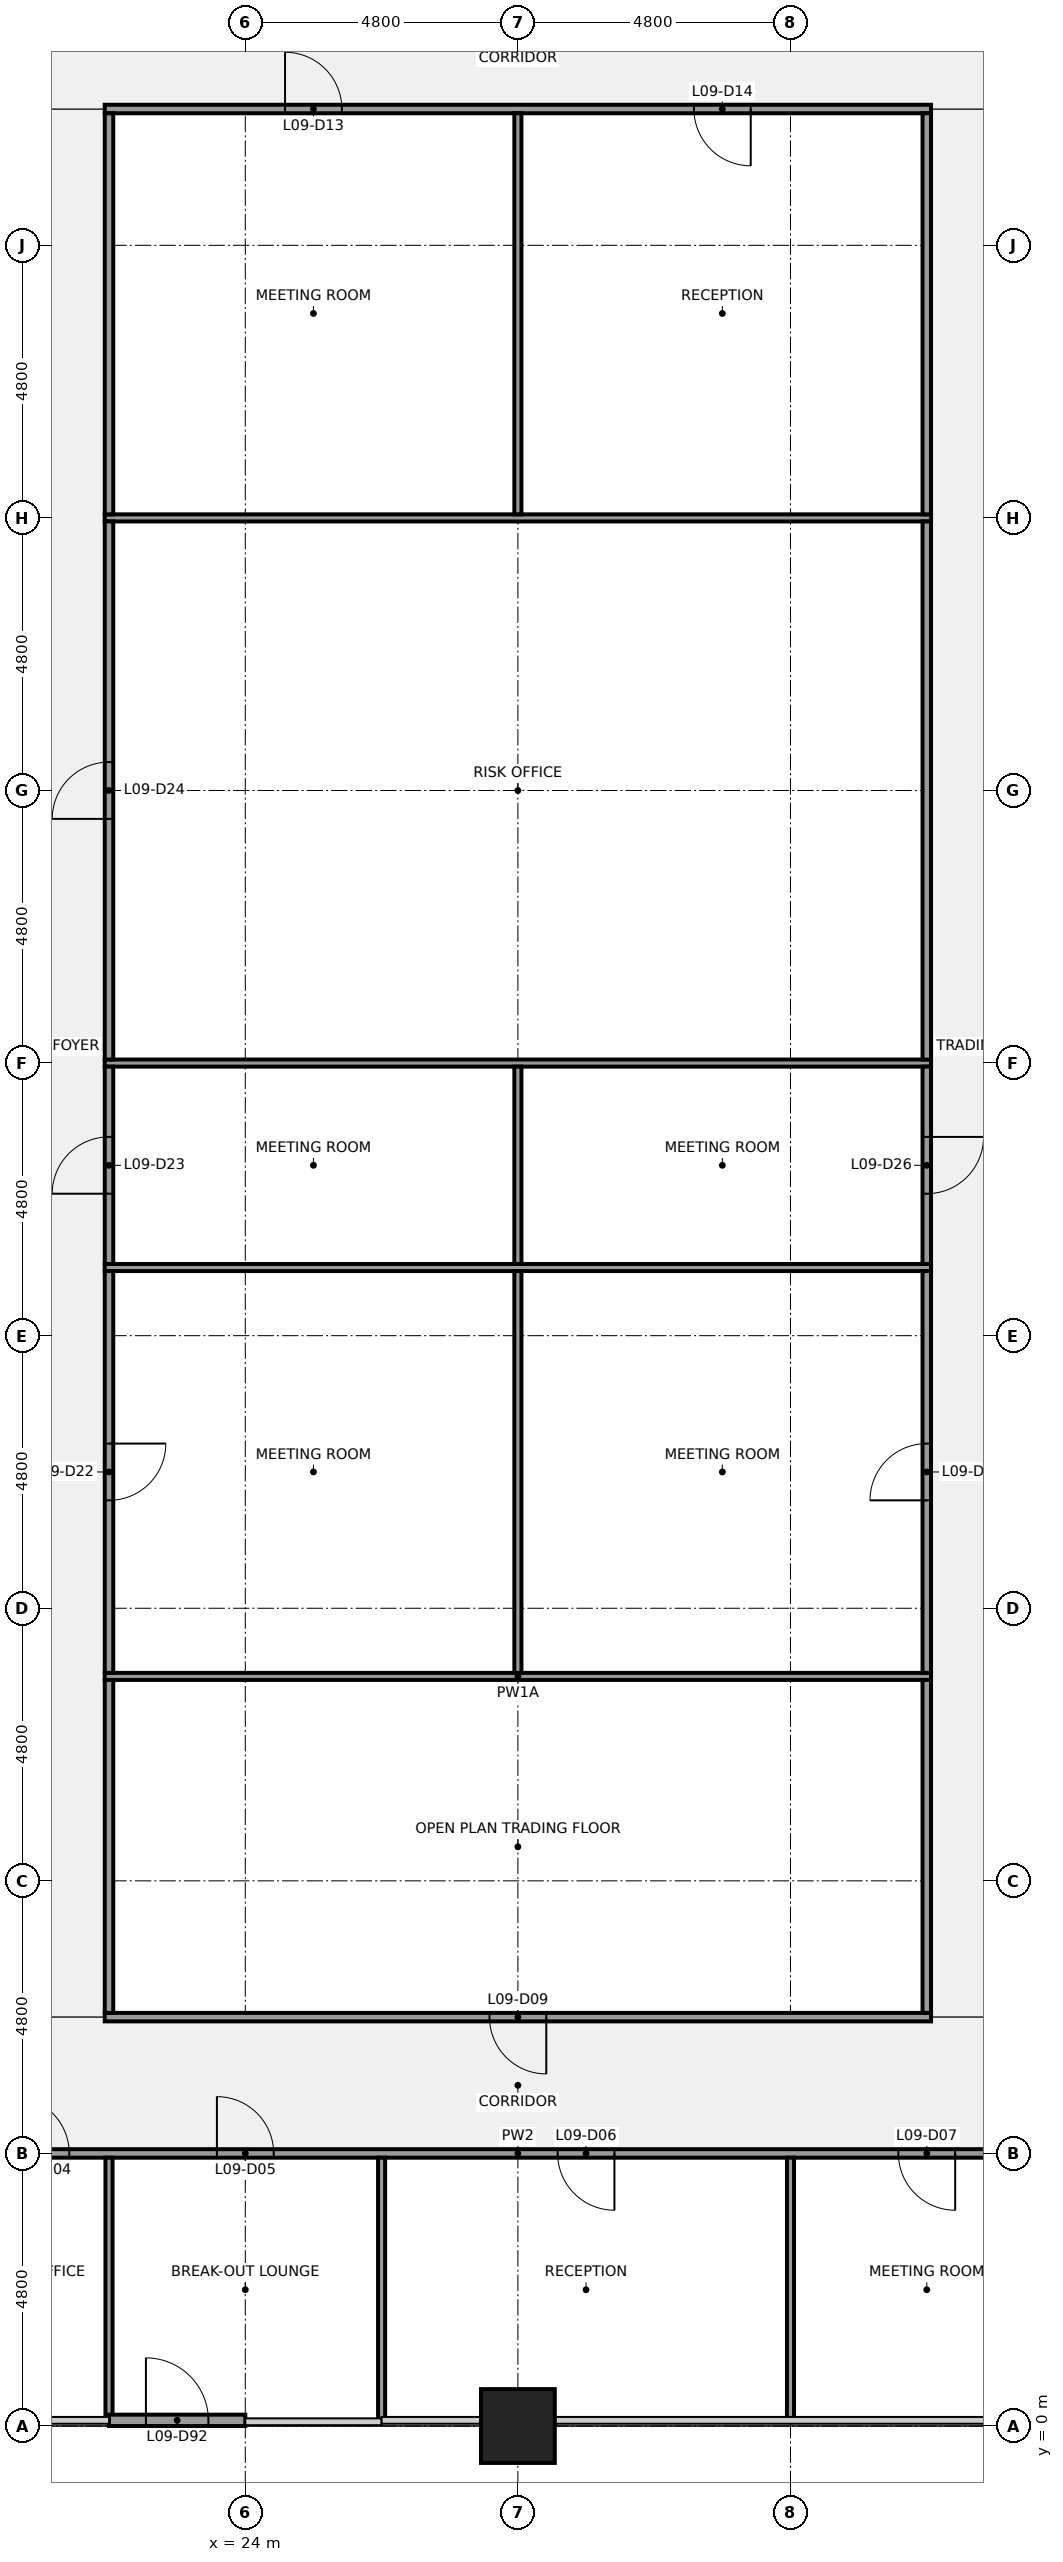
"""IFC4 building model, lengths in metres.
Left out: names, types, materials, properties, quantities, classifications, styles, units other than length and angle.
Written with IfcOpenShell. Run it as: python <this file> out.ifc"""

import sys

from ifc_helpers import new_model, si_unit, direction, frame, frame_2d, origin, origin_2d, place, context, subcontext, project, spatial, rectangle, extrude, element, fill, save


model = new_model("IFC4")
c1 = context("Model", 3, precision=1e-05, world=origin(), true_north=direction((0.0, 1.0)))
c2 = subcontext(c1, "Body", "Model", "MODEL_VIEW")
j1 = project(units=[si_unit("LENGTHUNIT", "METRE"), si_unit("PLANEANGLEUNIT", "RADIAN")], contexts=[c1])
p1 = place(None, origin())
s1 = spatial("IfcSite", under=j1, at=p1, CompositionType="ELEMENT")
p2 = place(p1, origin())
s2 = spatial("IfcBuilding", under=s1, at=p2, CompositionType="ELEMENT")
p3 = place(p2, frame((0.0, 0.0, 47.0)))
s3 = spatial("IfcBuildingStorey", under=s2, at=p3, CompositionType="ELEMENT", Elevation=47.0)
p4 = place(p3, frame((28.8, 0.0, 0.0), z_axis=(0.0, 0.0, 1.0), x_axis=(1.0, 0.0, 0.0)))
e1 = element("IfcColumn", 1, at=p4, inside=s3, PredefinedType="COLUMN", context=c2, shape_type="SweptSolid", body=[
    extrude(rectangle(XDim=1.3, YDim=1.3, at=origin_2d()), origin(), (0.0, 0.0, 1.0), 4.0),
])
p5 = place(p3, frame((19.125, 4.8, 0.0), z_axis=(0.0, 0.0, 1.0), x_axis=(1.0, 0.0, 0.0)))
e2 = element("IfcWall", 2, at=p5, inside=s3, PredefinedType="PARTITIONING", context=c2, shape_type="SweptSolid", body=[
    extrude(rectangle(XDim=19.35, YDim=0.15, at=frame_2d((9.675, 0.0))), origin(), (0.0, 0.0, 1.0), 2.87),
])
p6 = place(p5, frame((0.775, 0.0, 0.0)))
e3 = element("IfcOpeningElement", 3, at=p6, cuts=e2, PredefinedType="OPENING", context=c2, shape_type="SweptSolid", body=[
    extrude(rectangle(XDim=1.0, YDim=2.1, at=frame_2d((0.5, 1.05))), frame((0.0, 0.085, 0.0), z_axis=(0.0, -1.0, 0.0), x_axis=(1.0, 0.0, 0.0)), (0.0, 0.0, 1.0), 0.17),
])
p7 = place(p5, frame((4.375, 0.0, 0.0)))
e4 = element("IfcOpeningElement", 4, at=p7, cuts=e2, PredefinedType="OPENING", context=c2, shape_type="SweptSolid", body=[
    extrude(rectangle(XDim=1.0, YDim=2.1, at=frame_2d((0.5, 1.05))), frame((0.0, 0.085, 0.0), z_axis=(0.0, -1.0, 0.0), x_axis=(1.0, 0.0, 0.0)), (0.0, 0.0, 1.0), 0.17),
])
p8 = place(p5, frame((10.375, 0.0, 0.0)))
e5 = element("IfcOpeningElement", 5, at=p8, cuts=e2, PredefinedType="OPENING", context=c2, shape_type="SweptSolid", body=[
    extrude(rectangle(XDim=1.0, YDim=2.1, at=frame_2d((0.5, 1.05))), frame((0.0, 0.085, 0.0), z_axis=(0.0, -1.0, 0.0), x_axis=(1.0, 0.0, 0.0)), (0.0, 0.0, 1.0), 0.17),
])
p9 = place(p5, frame((16.375, 0.0, 0.0)))
e6 = element("IfcOpeningElement", 6, at=p9, cuts=e2, PredefinedType="OPENING", context=c2, shape_type="SweptSolid", body=[
    extrude(rectangle(XDim=1.0, YDim=2.1, at=frame_2d((0.5, 1.05))), frame((0.0, 0.085, 0.0), z_axis=(0.0, -1.0, 0.0), x_axis=(1.0, 0.0, 0.0)), (0.0, 0.0, 1.0), 0.17),
])
p10 = place(p3, frame((21.525, 7.2, 0.0), z_axis=(0.0, 0.0, 1.0), x_axis=(1.0, 0.0, 0.0)))
e7 = element("IfcWall", 7, at=p10, inside=s3, PredefinedType="PARTITIONING", context=c2, shape_type="SweptSolid", body=[
    extrude(rectangle(XDim=14.55, YDim=0.15, at=frame_2d((7.275, 0.0))), origin(), (0.0, 0.0, 1.0), 2.87),
])
p11 = place(p10, frame((6.775, 0.0, 0.0)))
e8 = element("IfcOpeningElement", 8, at=p11, cuts=e7, PredefinedType="OPENING", context=c2, shape_type="SweptSolid", body=[
    extrude(rectangle(XDim=1.0, YDim=2.1, at=frame_2d((0.5, 1.05))), frame((0.0, 0.085, 0.0), z_axis=(0.0, -1.0, 0.0), x_axis=(1.0, 0.0, 0.0)), (0.0, 0.0, 1.0), 0.17),
])
for number, where, z_axis, x_axis in (
    (9, (21.525, 13.2, 0.0), (0.0, 0.0, 1.0), (1.0, 0.0, 0.0)),
    (10, (21.525, 20.4, 0.0), (0.0, 0.0, 1.0), (1.0, 0.0, 0.0)),
    (11, (21.525, 24.0, 0.0), (0.0, 0.0, 1.0), (1.0, 0.0, 0.0)),
    (12, (21.525, 33.6, 0.0), (0.0, 0.0, 1.0), (1.0, 0.0, 0.0)),
):
    element("IfcWall", number, at=place(p3, frame(where, z_axis=z_axis, x_axis=x_axis)), inside=s3, PredefinedType="PARTITIONING", context=c2, shape_type="SweptSolid", body=[
        extrude(rectangle(XDim=14.55, YDim=0.125, at=frame_2d((7.275, 0.0))), origin(), (0.0, 0.0, 1.0), 2.87),
    ])
p12 = place(p3, frame((21.525, 40.8, 0.0), z_axis=(0.0, 0.0, 1.0), x_axis=(1.0, 0.0, 0.0)))
e13 = element("IfcWall", 13, at=p12, inside=s3, PredefinedType="PARTITIONING", context=c2, shape_type="SweptSolid", body=[
    extrude(rectangle(XDim=14.55, YDim=0.15, at=frame_2d((7.275, 0.0))), origin(), (0.0, 0.0, 1.0), 2.87),
])
p13 = place(p12, frame((3.175, 0.0, 0.0)))
e14 = element("IfcOpeningElement", 14, at=p13, cuts=e13, PredefinedType="OPENING", context=c2, shape_type="SweptSolid", body=[
    extrude(rectangle(XDim=1.0, YDim=2.1, at=frame_2d((0.5, 1.05))), frame((0.0, 0.085, 0.0), z_axis=(0.0, -1.0, 0.0), x_axis=(1.0, 0.0, 0.0)), (0.0, 0.0, 1.0), 0.17),
])
p14 = place(p12, frame((10.375, 0.0, 0.0)))
e15 = element("IfcOpeningElement", 15, at=p14, cuts=e13, PredefinedType="OPENING", context=c2, shape_type="SweptSolid", body=[
    extrude(rectangle(XDim=1.0, YDim=2.1, at=frame_2d((0.5, 1.05))), frame((0.0, 0.085, 0.0), z_axis=(0.0, -1.0, 0.0), x_axis=(1.0, 0.0, 0.0)), (0.0, 0.0, 1.0), 0.17),
])
p15 = place(p3, frame((21.6, 0.1, 0.0), z_axis=(0.0, 0.0, 1.0), x_axis=(0.0, 1.0, 0.0)))
e16 = element("IfcWall", 16, at=p15, inside=s3, PredefinedType="PARTITIONING", context=c2, shape_type="SweptSolid", body=[
    extrude(rectangle(XDim=4.625, YDim=0.125, at=frame_2d((2.312, 0.0))), origin(), (0.0, 0.0, 1.0), 2.87),
])
p16 = place(p3, frame((21.6, 7.275, 0.0), z_axis=(0.0, 0.0, 1.0), x_axis=(0.0, 1.0, 0.0)))
e17 = element("IfcWall", 17, at=p16, inside=s3, PredefinedType="PARTITIONING", context=c2, shape_type="SweptSolid", body=[
    extrude(rectangle(XDim=5.863, YDim=0.15, at=frame_2d((2.931, 0.0))), origin(), (0.0, 0.0, 1.0), 2.87),
])
p17 = place(p3, frame((21.6, 13.262, 0.0), z_axis=(0.0, 0.0, 1.0), x_axis=(0.0, 1.0, 0.0)))
e18 = element("IfcWall", 18, at=p17, inside=s3, PredefinedType="PARTITIONING", context=c2, shape_type="SweptSolid", body=[
    extrude(rectangle(XDim=7.075, YDim=0.15, at=frame_2d((3.538, 0.0))), origin(), (0.0, 0.0, 1.0), 2.87),
])
p18 = place(p17, frame((3.038, 0.0, 0.0)))
e19 = element("IfcOpeningElement", 19, at=p18, cuts=e18, PredefinedType="OPENING", context=c2, shape_type="SweptSolid", body=[
    extrude(rectangle(XDim=1.0, YDim=2.1, at=frame_2d((0.5, 1.05))), frame((0.0, 0.085, 0.0), z_axis=(0.0, -1.0, 0.0), x_axis=(1.0, 0.0, 0.0)), (0.0, 0.0, 1.0), 0.17),
])
p19 = place(p3, frame((21.6, 20.462, 0.0), z_axis=(0.0, 0.0, 1.0), x_axis=(0.0, 1.0, 0.0)))
e20 = element("IfcWall", 20, at=p19, inside=s3, PredefinedType="PARTITIONING", context=c2, shape_type="SweptSolid", body=[
    extrude(rectangle(XDim=3.475, YDim=0.15, at=frame_2d((1.738, 0.0))), origin(), (0.0, 0.0, 1.0), 2.87),
])
p20 = place(p19, frame((1.238, 0.0, 0.0)))
e21 = element("IfcOpeningElement", 21, at=p20, cuts=e20, PredefinedType="OPENING", context=c2, shape_type="SweptSolid", body=[
    extrude(rectangle(XDim=1.0, YDim=2.1, at=frame_2d((0.5, 1.05))), frame((0.0, 0.085, 0.0), z_axis=(0.0, -1.0, 0.0), x_axis=(1.0, 0.0, 0.0)), (0.0, 0.0, 1.0), 0.17),
])
p21 = place(p3, frame((21.6, 24.062, 0.0), z_axis=(0.0, 0.0, 1.0), x_axis=(0.0, 1.0, 0.0)))
e22 = element("IfcWall", 22, at=p21, inside=s3, PredefinedType="PARTITIONING", context=c2, shape_type="SweptSolid", body=[
    extrude(rectangle(XDim=9.475, YDim=0.15, at=frame_2d((4.738, 0.0))), origin(), (0.0, 0.0, 1.0), 2.87),
])
p22 = place(p21, frame((4.238, 0.0, 0.0)))
e23 = element("IfcOpeningElement", 23, at=p22, cuts=e22, PredefinedType="OPENING", context=c2, shape_type="SweptSolid", body=[
    extrude(rectangle(XDim=1.0, YDim=2.1, at=frame_2d((0.5, 1.05))), frame((0.0, 0.085, 0.0), z_axis=(0.0, -1.0, 0.0), x_axis=(1.0, 0.0, 0.0)), (0.0, 0.0, 1.0), 0.17),
])
p23 = place(p3, frame((21.6, 33.663, 0.0), z_axis=(0.0, 0.0, 1.0), x_axis=(0.0, 1.0, 0.0)))
e24 = element("IfcWall", 24, at=p23, inside=s3, PredefinedType="PARTITIONING", context=c2, shape_type="SweptSolid", body=[
    extrude(rectangle(XDim=7.062, YDim=0.15, at=frame_2d((3.531, 0.0))), origin(), (0.0, 0.0, 1.0), 2.87),
])
p24 = place(p3, frame((26.4, 0.1, 0.0), z_axis=(0.0, 0.0, 1.0), x_axis=(0.0, 1.0, 0.0)))
e25 = element("IfcWall", 25, at=p24, inside=s3, PredefinedType="PARTITIONING", context=c2, shape_type="SweptSolid", body=[
    extrude(rectangle(XDim=4.625, YDim=0.125, at=frame_2d((2.312, 0.0))), origin(), (0.0, 0.0, 1.0), 2.87),
])
p25 = place(p3, frame((28.8, 13.262, 0.0), z_axis=(0.0, 0.0, 1.0), x_axis=(0.0, 1.0, 0.0)))
e26 = element("IfcWall", 26, at=p25, inside=s3, PredefinedType="PARTITIONING", context=c2, shape_type="SweptSolid", body=[
    extrude(rectangle(XDim=7.075, YDim=0.125, at=frame_2d((3.538, 0.0))), origin(), (0.0, 0.0, 1.0), 2.87),
])
p26 = place(p3, frame((28.8, 20.462, 0.0), z_axis=(0.0, 0.0, 1.0), x_axis=(0.0, 1.0, 0.0)))
e27 = element("IfcWall", 27, at=p26, inside=s3, PredefinedType="PARTITIONING", context=c2, shape_type="SweptSolid", body=[
    extrude(rectangle(XDim=3.475, YDim=0.125, at=frame_2d((1.738, 0.0))), origin(), (0.0, 0.0, 1.0), 2.87),
])
p27 = place(p3, frame((28.8, 33.663, 0.0), z_axis=(0.0, 0.0, 1.0), x_axis=(0.0, 1.0, 0.0)))
e28 = element("IfcWall", 28, at=p27, inside=s3, PredefinedType="PARTITIONING", context=c2, shape_type="SweptSolid", body=[
    extrude(rectangle(XDim=7.062, YDim=0.125, at=frame_2d((3.531, 0.0))), origin(), (0.0, 0.0, 1.0), 2.87),
])
p28 = place(p3, frame((33.6, 0.1, 0.0), z_axis=(0.0, 0.0, 1.0), x_axis=(0.0, 1.0, 0.0)))
e29 = element("IfcWall", 29, at=p28, inside=s3, PredefinedType="PARTITIONING", context=c2, shape_type="SweptSolid", body=[
    extrude(rectangle(XDim=4.625, YDim=0.125, at=frame_2d((2.312, 0.0))), origin(), (0.0, 0.0, 1.0), 2.87),
])
p29 = place(p3, frame((36.0, 7.275, 0.0), z_axis=(0.0, 0.0, 1.0), x_axis=(0.0, 1.0, 0.0)))
e30 = element("IfcWall", 30, at=p29, inside=s3, PredefinedType="PARTITIONING", context=c2, shape_type="SweptSolid", body=[
    extrude(rectangle(XDim=5.863, YDim=0.15, at=frame_2d((2.931, 0.0))), origin(), (0.0, 0.0, 1.0), 2.87),
])
p30 = place(p3, frame((36.0, 13.262, 0.0), z_axis=(0.0, 0.0, 1.0), x_axis=(0.0, 1.0, 0.0)))
e31 = element("IfcWall", 31, at=p30, inside=s3, PredefinedType="PARTITIONING", context=c2, shape_type="SweptSolid", body=[
    extrude(rectangle(XDim=7.075, YDim=0.15, at=frame_2d((3.538, 0.0))), origin(), (0.0, 0.0, 1.0), 2.87),
])
p31 = place(p30, frame((3.038, 0.0, 0.0)))
e32 = element("IfcOpeningElement", 32, at=p31, cuts=e31, PredefinedType="OPENING", context=c2, shape_type="SweptSolid", body=[
    extrude(rectangle(XDim=1.0, YDim=2.1, at=frame_2d((0.5, 1.05))), frame((0.0, 0.085, 0.0), z_axis=(0.0, -1.0, 0.0), x_axis=(1.0, 0.0, 0.0)), (0.0, 0.0, 1.0), 0.17),
])
p32 = place(p3, frame((36.0, 20.462, 0.0), z_axis=(0.0, 0.0, 1.0), x_axis=(0.0, 1.0, 0.0)))
e33 = element("IfcWall", 33, at=p32, inside=s3, PredefinedType="PARTITIONING", context=c2, shape_type="SweptSolid", body=[
    extrude(rectangle(XDim=3.475, YDim=0.15, at=frame_2d((1.738, 0.0))), origin(), (0.0, 0.0, 1.0), 2.87),
])
p33 = place(p32, frame((1.238, 0.0, 0.0)))
e34 = element("IfcOpeningElement", 34, at=p33, cuts=e33, PredefinedType="OPENING", context=c2, shape_type="SweptSolid", body=[
    extrude(rectangle(XDim=1.0, YDim=2.1, at=frame_2d((0.5, 1.05))), frame((0.0, 0.085, 0.0), z_axis=(0.0, -1.0, 0.0), x_axis=(1.0, 0.0, 0.0)), (0.0, 0.0, 1.0), 0.17),
])
p34 = place(p3, frame((36.0, 24.062, 0.0), z_axis=(0.0, 0.0, 1.0), x_axis=(0.0, 1.0, 0.0)))
e35 = element("IfcWall", 35, at=p34, inside=s3, PredefinedType="PARTITIONING", context=c2, shape_type="SweptSolid", body=[
    extrude(rectangle(XDim=9.475, YDim=0.15, at=frame_2d((4.738, 0.0))), origin(), (0.0, 0.0, 1.0), 2.87),
])
p35 = place(p3, frame((36.0, 33.663, 0.0), z_axis=(0.0, 0.0, 1.0), x_axis=(0.0, 1.0, 0.0)))
e36 = element("IfcWall", 36, at=p35, inside=s3, PredefinedType="PARTITIONING", context=c2, shape_type="SweptSolid", body=[
    extrude(rectangle(XDim=7.062, YDim=0.15, at=frame_2d((3.531, 0.0))), origin(), (0.0, 0.0, 1.0), 2.87),
])
p36 = place(p3, frame((21.6, 0.1, 0.0), z_axis=(0.0, 0.0, 1.0), x_axis=(1.0, 0.0, 0.0)))
e37 = element("IfcWall", 37, at=p36, inside=s3, PredefinedType="SOLIDWALL", context=c2, shape_type="SweptSolid", body=[
    extrude(rectangle(XDim=2.4, YDim=0.2, at=frame_2d((1.2, 0.0))), origin(), (0.0, 0.0, 1.0), 3.314),
])
p37 = place(p36, frame((0.65, 0.0, 0.0)))
e38 = element("IfcOpeningElement", 38, at=p37, cuts=e37, PredefinedType="OPENING", context=c2, shape_type="SweptSolid", body=[
    extrude(rectangle(XDim=1.1, YDim=2.1, at=frame_2d((0.55, 1.05))), frame((0.0, 0.11, 0.0), z_axis=(0.0, -1.0, 0.0), x_axis=(1.0, 0.0, 0.0)), (0.0, 0.0, 1.0), 0.22),
])
for number, where, z_axis, x_axis in (
    (39, (19.2, -1.075, 0.0), (0.0, 0.0, 1.0), (1.0, 0.0, 0.0)),
    (40, (38.4, -1.075, 0.0), (0.0, 0.0, 1.0), (1.0, 0.0, 0.0)),
):
    element("IfcColumn", number, at=place(p3, frame(where, z_axis=z_axis, x_axis=x_axis)), inside=s3, PredefinedType="PILASTER", context=c2, shape_type="SweptSolid", body=[
        extrude(rectangle(XDim=4.2, YDim=0.85, at=origin_2d()), origin(), (0.0, 0.0, 1.0), 4.0),
    ])
p38 = place(p6, origin())
e41 = element("IfcDoor", 41, at=p38, inside=s3, OperationType="SINGLE_SWING_LEFT", PredefinedType="DOOR", context=c2, shape_type="SweptSolid", body=[
    extrude(rectangle(XDim=1.0, YDim=2.1, at=frame_2d((0.5, 1.05))), frame((0.0, 0.025, 0.0), z_axis=(0.0, -1.0, 0.0), x_axis=(1.0, 0.0, 0.0)), (0.0, 0.0, 1.0), 0.05),
])
fill(e3, e41)
p39 = place(p7, origin())
e42 = element("IfcDoor", 42, at=p39, inside=s3, OperationType="SINGLE_SWING_LEFT", PredefinedType="DOOR", context=c2, shape_type="SweptSolid", body=[
    extrude(rectangle(XDim=1.0, YDim=2.1, at=frame_2d((0.5, 1.05))), frame((0.0, 0.025, 0.0), z_axis=(0.0, -1.0, 0.0), x_axis=(1.0, 0.0, 0.0)), (0.0, 0.0, 1.0), 0.05),
])
fill(e4, e42)
p40 = place(p8, origin())
e43 = element("IfcDoor", 43, at=p40, inside=s3, OperationType="SINGLE_SWING_RIGHT", PredefinedType="DOOR", context=c2, shape_type="SweptSolid", body=[
    extrude(rectangle(XDim=1.0, YDim=2.1, at=frame_2d((0.5, 1.05))), frame((0.0, 0.025, 0.0), z_axis=(0.0, -1.0, 0.0), x_axis=(1.0, 0.0, 0.0)), (0.0, 0.0, 1.0), 0.05),
])
fill(e5, e43)
p41 = place(p9, origin())
e44 = element("IfcDoor", 44, at=p41, inside=s3, OperationType="SINGLE_SWING_RIGHT", PredefinedType="DOOR", context=c2, shape_type="SweptSolid", body=[
    extrude(rectangle(XDim=1.0, YDim=2.1, at=frame_2d((0.5, 1.05))), frame((0.0, 0.025, 0.0), z_axis=(0.0, -1.0, 0.0), x_axis=(1.0, 0.0, 0.0)), (0.0, 0.0, 1.0), 0.05),
])
fill(e6, e44)
p42 = place(p11, origin())
e45 = element("IfcDoor", 45, at=p42, inside=s3, OperationType="SINGLE_SWING_RIGHT", PredefinedType="DOOR", context=c2, shape_type="SweptSolid", body=[
    extrude(rectangle(XDim=1.0, YDim=2.1, at=frame_2d((0.5, 1.05))), frame((0.0, 0.025, 0.0), z_axis=(0.0, -1.0, 0.0), x_axis=(1.0, 0.0, 0.0)), (0.0, 0.0, 1.0), 0.05),
])
fill(e8, e45)
p43 = place(p13, origin())
e46 = element("IfcDoor", 46, at=p43, inside=s3, OperationType="SINGLE_SWING_LEFT", PredefinedType="DOOR", context=c2, shape_type="SweptSolid", body=[
    extrude(rectangle(XDim=1.0, YDim=2.1, at=frame_2d((0.5, 1.05))), frame((0.0, 0.025, 0.0), z_axis=(0.0, -1.0, 0.0), x_axis=(1.0, 0.0, 0.0)), (0.0, 0.0, 1.0), 0.05),
])
fill(e14, e46)
p44 = place(p14, origin())
e47 = element("IfcDoor", 47, at=p44, inside=s3, OperationType="SINGLE_SWING_RIGHT", PredefinedType="DOOR", context=c2, shape_type="SweptSolid", body=[
    extrude(rectangle(XDim=1.0, YDim=2.1, at=frame_2d((0.5, 1.05))), frame((0.0, 0.025, 0.0), z_axis=(0.0, -1.0, 0.0), x_axis=(1.0, 0.0, 0.0)), (0.0, 0.0, 1.0), 0.05),
])
fill(e15, e47)
p45 = place(p18, origin())
e48 = element("IfcDoor", 48, at=p45, inside=s3, OperationType="SINGLE_SWING_RIGHT", PredefinedType="DOOR", context=c2, shape_type="SweptSolid", body=[
    extrude(rectangle(XDim=1.0, YDim=2.1, at=frame_2d((0.5, 1.05))), frame((0.0, 0.025, 0.0), z_axis=(0.0, -1.0, 0.0), x_axis=(1.0, 0.0, 0.0)), (0.0, 0.0, 1.0), 0.05),
])
fill(e19, e48)
p46 = place(p20, origin())
e49 = element("IfcDoor", 49, at=p46, inside=s3, OperationType="SINGLE_SWING_LEFT", PredefinedType="DOOR", context=c2, shape_type="SweptSolid", body=[
    extrude(rectangle(XDim=1.0, YDim=2.1, at=frame_2d((0.5, 1.05))), frame((0.0, 0.025, 0.0), z_axis=(0.0, -1.0, 0.0), x_axis=(1.0, 0.0, 0.0)), (0.0, 0.0, 1.0), 0.05),
])
fill(e21, e49)
p47 = place(p22, origin())
e50 = element("IfcDoor", 50, at=p47, inside=s3, OperationType="SINGLE_SWING_LEFT", PredefinedType="DOOR", context=c2, shape_type="SweptSolid", body=[
    extrude(rectangle(XDim=1.0, YDim=2.1, at=frame_2d((0.5, 1.05))), frame((0.0, 0.025, 0.0), z_axis=(0.0, -1.0, 0.0), x_axis=(1.0, 0.0, 0.0)), (0.0, 0.0, 1.0), 0.05),
])
fill(e23, e50)
p48 = place(p31, origin())
e51 = element("IfcDoor", 51, at=p48, inside=s3, OperationType="SINGLE_SWING_LEFT", PredefinedType="DOOR", context=c2, shape_type="SweptSolid", body=[
    extrude(rectangle(XDim=1.0, YDim=2.1, at=frame_2d((0.5, 1.05))), frame((0.0, 0.025, 0.0), z_axis=(0.0, -1.0, 0.0), x_axis=(1.0, 0.0, 0.0)), (0.0, 0.0, 1.0), 0.05),
])
fill(e32, e51)
p49 = place(p33, origin())
e52 = element("IfcDoor", 52, at=p49, inside=s3, OperationType="SINGLE_SWING_RIGHT", PredefinedType="DOOR", context=c2, shape_type="SweptSolid", body=[
    extrude(rectangle(XDim=1.0, YDim=2.1, at=frame_2d((0.5, 1.05))), frame((0.0, 0.025, 0.0), z_axis=(0.0, -1.0, 0.0), x_axis=(1.0, 0.0, 0.0)), (0.0, 0.0, 1.0), 0.05),
])
fill(e34, e52)
p50 = place(p37, origin())
e53 = element("IfcDoor", 53, at=p50, inside=s3, OperationType="SINGLE_SWING_LEFT", PredefinedType="DOOR", context=c2, shape_type="SweptSolid", body=[
    extrude(rectangle(XDim=1.1, YDim=2.1, at=frame_2d((0.55, 1.05))), frame((0.0, 0.025, 0.0), z_axis=(0.0, -1.0, 0.0), x_axis=(1.0, 0.0, 0.0)), (0.0, 0.0, 1.0), 0.05),
])
fill(e38, e53)
save(model, sys.argv[1])
